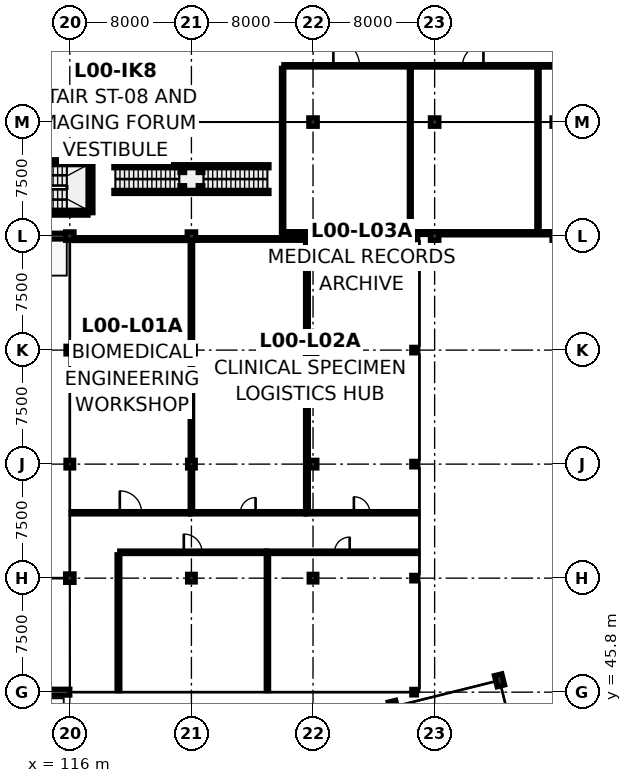
"""IFC4 building model, lengths in metres.
Left out: names, types, materials, properties, quantities, classifications, styles, units other than length and angle.
Written with IfcOpenShell. Run it as: python <this file> out.ifc"""

import sys

from ifc_helpers import new_model, si_unit, direction, frame, frame_2d, origin, origin_2d, place, context, subcontext, project, spatial, rectangle, i_section, extrude, element, fill, save


model = new_model("IFC4")
c1 = context("Model", 3, precision=1e-05, world=origin(), true_north=direction((0.0, 1.0)))
c2 = subcontext(c1, "Body", "Model", "MODEL_VIEW")
j1 = project(units=[si_unit("LENGTHUNIT", "METRE"), si_unit("PLANEANGLEUNIT", "RADIAN")], contexts=[c1])
p1 = place(None, origin())
s1 = spatial("IfcSite", under=j1, at=p1, CompositionType="ELEMENT")
p2 = place(p1, origin())
s2 = spatial("IfcBuilding", under=s1, at=p2, CompositionType="ELEMENT")
p3 = place(p2, origin())
s3 = spatial("IfcBuildingStorey", under=s2, at=p3, CompositionType="ELEMENT", Elevation=0.0)
p4 = place(p3, frame((116.0, 53.3, 0.0), z_axis=(0.0, 0.0, 1.0), x_axis=(1.0, 0.0, 0.0)))
e1 = element("IfcColumn", 1, at=p4, inside=s3, PredefinedType="COLUMN", context=c2, shape_type="SweptSolid", body=[
    extrude(rectangle(XDim=0.55, YDim=0.55, at=origin_2d()), origin(), (0.0, 0.0, 1.0), 4.7),
])
for number, where, z_axis, x_axis in (
    (2, (116.0, 60.8, 0.0), (0.0, 0.0, 1.0), (1.0, 0.0, 0.0)),
    (3, (116.0, 68.3, 0.0), (0.0, 0.0, 1.0), (1.0, 0.0, 0.0)),
):
    element("IfcColumn", number, at=place(p3, frame(where, z_axis=z_axis, x_axis=x_axis)), inside=s3, PredefinedType="COLUMN", context=c2, shape_type="SweptSolid", body=[
        extrude(rectangle(XDim=0.5, YDim=0.5, at=origin_2d()), origin(), (0.0, 0.0, 1.0), 4.704),
    ])
for number, where, z_axis, x_axis in (
    (4, (116.0, 75.8, 0.0), (0.0, 0.0, 1.0), (1.0, 0.0, 0.0)),
    (5, (116.0, 83.3, 0.0), (0.0, 0.0, 1.0), (1.0, 0.0, 0.0)),
):
    element("IfcColumn", number, at=place(p3, frame(where, z_axis=z_axis, x_axis=x_axis)), inside=s3, PredefinedType="COLUMN", context=c2, shape_type="SweptSolid", body=[
        extrude(rectangle(XDim=0.55, YDim=0.55, at=origin_2d()), origin(), (0.0, 0.0, 1.0), 4.7),
    ])
for number, where, z_axis, x_axis in (
    (6, (124.0, 53.3, 0.0), (0.0, 0.0, 1.0), (1.0, 0.0, 0.0)),
    (7, (124.0, 60.8, 0.0), (0.0, 0.0, 1.0), (1.0, 0.0, 0.0)),
    (8, (124.0, 68.3, 0.0), (0.0, 0.0, 1.0), (1.0, 0.0, 0.0)),
):
    element("IfcColumn", number, at=place(p3, frame(where, z_axis=z_axis, x_axis=x_axis)), inside=s3, PredefinedType="COLUMN", context=c2, shape_type="SweptSolid", body=[
        extrude(rectangle(XDim=0.5, YDim=0.5, at=origin_2d()), origin(), (0.0, 0.0, 1.0), 4.704),
    ])
for number, where, z_axis, x_axis in (
    (9, (124.0, 75.8, 0.0), (0.0, 0.0, 1.0), (1.0, 0.0, 0.0)),
    (10, (124.0, 83.3, 0.0), (0.0, 0.0, 1.0), (1.0, 0.0, 0.0)),
):
    element("IfcColumn", number, at=place(p3, frame(where, z_axis=z_axis, x_axis=x_axis)), inside=s3, PredefinedType="COLUMN", context=c2, shape_type="SweptSolid", body=[
        extrude(rectangle(XDim=0.55, YDim=0.55, at=origin_2d()), origin(), (0.0, 0.0, 1.0), 4.7),
    ])
for number, where, z_axis, x_axis in (
    (11, (132.0, 53.3, 0.0), (0.0, 0.0, 1.0), (1.0, 0.0, 0.0)),
    (12, (132.0, 60.8, 0.0), (0.0, 0.0, 1.0), (1.0, 0.0, 0.0)),
    (13, (132.0, 68.3, 0.0), (0.0, 0.0, 1.0), (1.0, 0.0, 0.0)),
):
    element("IfcColumn", number, at=place(p3, frame(where, z_axis=z_axis, x_axis=x_axis)), inside=s3, PredefinedType="COLUMN", context=c2, shape_type="SweptSolid", body=[
        extrude(rectangle(XDim=0.5, YDim=0.5, at=origin_2d()), origin(), (0.0, 0.0, 1.0), 4.704),
    ])
for number, where, z_axis, x_axis in (
    (14, (132.0, 75.8, 0.0), (0.0, 0.0, 1.0), (1.0, 0.0, 0.0)),
    (15, (132.0, 83.3, 0.0), (0.0, 0.0, 1.0), (1.0, 0.0, 0.0)),
    (16, (140.0, 75.8, 0.0), (0.0, 0.0, 1.0), (1.0, 0.0, 0.0)),
    (17, (140.0, 83.3, 0.0), (0.0, 0.0, 1.0), (1.0, 0.0, 0.0)),
):
    element("IfcColumn", number, at=place(p3, frame(where, z_axis=z_axis, x_axis=x_axis)), inside=s3, PredefinedType="COLUMN", context=c2, shape_type="SweptSolid", body=[
        extrude(rectangle(XDim=0.55, YDim=0.55, at=origin_2d()), origin(), (0.0, 0.0, 1.0), 4.7),
    ])
for number, where, z_axis, x_axis in (
    (18, (137.281, 44.837, 0.0), (0.0, 0.0, 1.0), (0.97, 0.242, 0.0)),
    (19, (144.268, 46.579, 0.0), (0.0, 0.0, 1.0), (0.97, 0.242, 0.0)),
):
    element("IfcColumn", number, at=place(p3, frame(where, z_axis=z_axis, x_axis=x_axis)), inside=s3, PredefinedType="COLUMN", context=c2, shape_type="SweptSolid", body=[
        extrude(rectangle(XDim=0.5, YDim=0.75, at=origin_2d()), origin(), (0.0, 0.0, 1.0), 4.7),
    ])
p5 = place(p3, frame((138.65, 45.8, 0.0), z_axis=(0.0, 0.0, 1.0), x_axis=(1.0, 0.0, 0.0)))
e20 = element("IfcColumn", 20, at=p5, inside=s3, PredefinedType="COLUMN", context=c2, shape_type="SweptSolid", body=[
    extrude(i_section(OverallWidth=0.3, OverallDepth=0.36, WebThickness=0.012, FlangeThickness=0.022, FilletRadius=0.027, at=origin_2d()), origin(), (0.0, 0.0, 1.0), 4.735),
])
for number, where, z_axis, x_axis in (
    (21, (138.65, 53.3, 0.0), (0.0, 0.0, 1.0), (1.0, 0.0, 0.0)),
    (22, (138.65, 60.8, 0.0), (0.0, 0.0, 1.0), (1.0, 0.0, 0.0)),
):
    element("IfcColumn", number, at=place(p3, frame(where, z_axis=z_axis, x_axis=x_axis)), inside=s3, PredefinedType="COLUMN", context=c2, shape_type="SweptSolid", body=[
        extrude(i_section(OverallWidth=0.3, OverallDepth=0.36, WebThickness=0.012, FlangeThickness=0.022, FilletRadius=0.027, at=origin_2d()), origin(), (0.0, 0.0, 1.0), 4.733),
    ])
p6 = place(p3, frame((138.65, 68.3, 0.0), z_axis=(0.0, 0.0, 1.0), x_axis=(1.0, 0.0, 0.0)))
e23 = element("IfcColumn", 23, at=p6, inside=s3, PredefinedType="COLUMN", context=c2, shape_type="SweptSolid", body=[
    extrude(i_section(OverallWidth=0.3, OverallDepth=0.36, WebThickness=0.012, FlangeThickness=0.022, FilletRadius=0.027, at=origin_2d()), origin(), (0.0, 0.0, 1.0), 4.733),
])
p7 = place(p3, frame((138.65, 75.75, 0.0), z_axis=(0.0, 0.0, 1.0), x_axis=(1.0, 0.0, 0.0)))
e24 = element("IfcColumn", 24, at=p7, inside=s3, PredefinedType="COLUMN", context=c2, shape_type="SweptSolid", body=[
    extrude(i_section(OverallWidth=0.3, OverallDepth=0.36, WebThickness=0.012, FlangeThickness=0.022, FilletRadius=0.027, at=origin_2d()), origin(), (0.0, 0.0, 1.0), 6.102),
])
p8 = place(p3, frame((116.0, 45.8, 0.0), z_axis=(0.0, 0.0, 1.0), x_axis=(-1.0, 0.0, 0.0)))
e25 = element("IfcWall", 25, at=p8, inside=s3, PredefinedType="SOLIDWALL", context=c2, shape_type="SweptSolid", body=[
    extrude(rectangle(XDim=7.625, YDim=0.38, at=frame_2d((3.812, 0.0))), origin(), (0.0, 0.0, 1.0), 4.67),
])
p9 = place(p8, frame((2.663, 0.0, 0.0)))
e26 = element("IfcOpeningElement", 26, at=p9, cuts=e25, PredefinedType="OPENING", context=c2, shape_type="SweptSolid", body=[
    extrude(rectangle(XDim=2.3, YDim=2.5, at=frame_2d((1.15, 1.25))), frame((0.0, 0.202, 0.0), z_axis=(0.0, -1.0, 0.0), x_axis=(1.0, 0.0, 0.0)), (0.0, 0.0, 1.0), 0.404),
])
p10 = place(p3, frame((115.725, 75.8, 0.0), z_axis=(0.0, 0.0, 1.0), x_axis=(-1.0, 0.0, 0.0)))
e27 = element("IfcWall", 27, at=p10, inside=s3, PredefinedType="SOLIDWALL", context=c2, shape_type="SweptSolid", body=[
    extrude(rectangle(XDim=7.4, YDim=0.38, at=frame_2d((3.7, 0.0))), origin(), (0.0, 0.0, 1.0), 3.985),
])
p11 = place(p10, frame((2.7, 0.0, 0.0)))
e28 = element("IfcOpeningElement", 28, at=p11, cuts=e27, PredefinedType="OPENING", context=c2, shape_type="SweptSolid", body=[
    extrude(rectangle(XDim=2.0, YDim=2.35, at=frame_2d((1.0, 1.175))), frame((0.0, 0.202, 0.0), z_axis=(0.0, -1.0, 0.0), x_axis=(1.0, 0.0, 0.0)), (0.0, 0.0, 1.0), 0.404),
])
p12 = place(p3, frame((110.005, 77.34, 0.0), z_axis=(0.0, 0.0, 1.0), x_axis=(1.0, 0.0, 0.0)))
e29 = element("IfcWall", 29, at=p12, inside=s3, PredefinedType="SHEAR", context=c2, shape_type="SweptSolid", body=[
    extrude(rectangle(XDim=7.19, YDim=0.32, at=frame_2d((3.595, 0.0))), origin(), (0.0, 0.0, 1.0), 4.7),
])
p13 = place(p3, frame((117.36, 77.34, 0.0), z_axis=(0.0, 0.0, 1.0), x_axis=(0.0, 1.0, 0.0)))
e30 = element("IfcWall", 30, at=p13, inside=s3, PredefinedType="SHEAR", context=c2, shape_type="SweptSolid", body=[
    extrude(rectangle(XDim=3.32, YDim=0.32, at=frame_2d((1.66, 0.0))), origin(), (0.0, 0.0, 1.0), 4.7),
])
p14 = place(p3, frame((117.195, 80.66, 0.0), z_axis=(0.0, 0.0, 1.0), x_axis=(-1.0, 0.0, 0.0)))
e31 = element("IfcWall", 31, at=p14, inside=s3, PredefinedType="SHEAR", context=c2, shape_type="SweptSolid", body=[
    extrude(rectangle(XDim=7.19, YDim=0.32, at=frame_2d((3.595, 0.0))), origin(), (0.0, 0.0, 1.0), 4.7),
])
for number, where, z_axis, x_axis in (
    (32, (118.9, 78.705, 0.0), (0.0, 0.0, 1.0), (1.0, 0.0, 0.0)),
    (33, (118.9, 80.395, 0.0), (0.0, 0.0, 1.0), (1.0, 0.0, 0.0)),
):
    element("IfcWall", number, at=place(p3, frame(where, z_axis=z_axis, x_axis=x_axis)), inside=s3, PredefinedType="PARTITIONING", context=c2, shape_type="SweptSolid", body=[
        extrude(rectangle(XDim=10.2, YDim=0.2, at=frame_2d((5.1, 0.0))), origin(), (0.0, 0.0, 1.0), 2.3),
    ])
for number, where, z_axis, x_axis in (
    (34, (123.4, 78.965, 0.0), (0.0, 0.0, 1.0), (1.0, 0.0, 0.0)),
    (35, (124.6, 78.965, 0.0), (0.0, 0.0, 1.0), (1.0, 0.0, 0.0)),
    (36, (124.6, 80.135, 0.0), (0.0, 0.0, 1.0), (1.0, 0.0, 0.0)),
    (37, (123.4, 80.135, 0.0), (0.0, 0.0, 1.0), (1.0, 0.0, 0.0)),
):
    element("IfcColumn", number, at=place(p3, frame(where, z_axis=z_axis, x_axis=x_axis)), inside=s3, PredefinedType="COLUMN", context=c2, shape_type="SweptSolid", body=[
        extrude(i_section(OverallWidth=0.3, OverallDepth=0.3, WebThickness=0.011, FlangeThickness=0.019, FilletRadius=0.027, at=origin_2d()), origin(), (0.0, 0.0, 1.0), 2.3),
    ])
p15 = place(p3, frame((116.102, 57.6, 0.0), z_axis=(0.0, 0.0, 1.0), x_axis=(1.0, 0.0, 0.0)))
e38 = element("IfcWall", 38, at=p15, inside=s3, PredefinedType="PARTITIONING", context=c2, shape_type="SweptSolid", body=[
    extrude(rectangle(XDim=7.813, YDim=0.15, at=frame_2d((3.906, 0.0))), origin(), (0.0, 0.0, 1.0), 4.67),
])
p16 = place(p15, frame((3.187, 0.0, 0.0)))
e39 = element("IfcOpeningElement", 39, at=p16, cuts=e38, PredefinedType="OPENING", context=c2, shape_type="SweptSolid", body=[
    extrude(rectangle(XDim=1.44, YDim=2.32, at=frame_2d((0.72, 1.16))), frame((0.0, 0.087, 0.0), z_axis=(0.0, -1.0, 0.0), x_axis=(1.0, 0.0, 0.0)), (0.0, 0.0, 1.0), 0.174),
])
p17 = place(p3, frame((123.927, 57.6, 0.0), z_axis=(0.0, 0.0, 1.0), x_axis=(1.0, 0.0, 0.0)))
e40 = element("IfcWall", 40, at=p17, inside=s3, PredefinedType="PARTITIONING", context=c2, shape_type="SweptSolid", body=[
    extrude(rectangle(XDim=7.588, YDim=0.15, at=frame_2d((3.794, 0.0))), origin(), (0.0, 0.0, 1.0), 4.67),
])
p18 = place(p17, frame((3.294, 0.0, 0.0)))
e41 = element("IfcOpeningElement", 41, at=p18, cuts=e40, PredefinedType="OPENING", context=c2, shape_type="SweptSolid", body=[
    extrude(rectangle(XDim=1.0, YDim=2.15, at=frame_2d((0.5, 1.075))), frame((0.0, 0.087, 0.0), z_axis=(0.0, -1.0, 0.0), x_axis=(1.0, 0.0, 0.0)), (0.0, 0.0, 1.0), 0.174),
])
p19 = place(p3, frame((131.527, 57.6, 0.0), z_axis=(0.0, 0.0, 1.0), x_axis=(1.0, 0.0, 0.0)))
e42 = element("IfcWall", 42, at=p19, inside=s3, PredefinedType="PARTITIONING", context=c2, shape_type="SweptSolid", body=[
    extrude(rectangle(XDim=7.371, YDim=0.15, at=frame_2d((3.686, 0.0))), origin(), (0.0, 0.0, 1.0), 4.018),
])
p20 = place(p19, frame((3.16, 0.0, 0.0)))
e43 = element("IfcOpeningElement", 43, at=p20, cuts=e42, PredefinedType="OPENING", context=c2, shape_type="SweptSolid", body=[
    extrude(rectangle(XDim=1.05, YDim=2.15, at=frame_2d((0.525, 1.075))), frame((0.0, 0.087, 0.0), z_axis=(0.0, -1.0, 0.0), x_axis=(1.0, 0.0, 0.0)), (0.0, 0.0, 1.0), 0.174),
])
p21 = place(p3, frame((119.285, 55.0, 0.0), z_axis=(0.0, 0.0, 1.0), x_axis=(1.0, 0.0, 0.0)))
e44 = element("IfcWall", 44, at=p21, inside=s3, PredefinedType="PARTITIONING", context=c2, shape_type="SweptSolid", body=[
    extrude(rectangle(XDim=9.63, YDim=0.16, at=frame_2d((4.815, 0.0))), origin(), (0.0, 0.0, 1.0), 4.67),
])
p22 = place(p21, frame((4.215, 0.0, 0.0)))
e45 = element("IfcOpeningElement", 45, at=p22, cuts=e44, PredefinedType="OPENING", context=c2, shape_type="SweptSolid", body=[
    extrude(rectangle(XDim=1.2, YDim=2.15, at=frame_2d((0.6, 1.075))), frame((0.0, 0.092, 0.0), z_axis=(0.0, -1.0, 0.0), x_axis=(1.0, 0.0, 0.0)), (0.0, 0.0, 1.0), 0.184),
])
p23 = place(p3, frame((128.927, 55.0, 0.0), z_axis=(0.0, 0.0, 1.0), x_axis=(1.0, 0.0, 0.0)))
e46 = element("IfcWall", 46, at=p23, inside=s3, PredefinedType="PARTITIONING", context=c2, shape_type="SweptSolid", body=[
    extrude(rectangle(XDim=9.971, YDim=0.16, at=frame_2d((4.985, 0.0))), origin(), (0.0, 0.0, 1.0), 4.018),
])
p24 = place(p23, frame((4.486, 0.0, 0.0)))
e47 = element("IfcOpeningElement", 47, at=p24, cuts=e46, PredefinedType="OPENING", context=c2, shape_type="SweptSolid", body=[
    extrude(rectangle(XDim=1.0, YDim=2.22, at=frame_2d((0.5, 1.11))), frame((0.0, 0.092, 0.0), z_axis=(0.0, -1.0, 0.0), x_axis=(1.0, 0.0, 0.0)), (0.0, 0.0, 1.0), 0.184),
])
p25 = place(p3, frame((130.085, 87.0, 0.0), z_axis=(0.0, 0.0, 1.0), x_axis=(1.0, 0.0, 0.0)))
e48 = element("IfcWall", 48, at=p25, inside=s3, PredefinedType="PARTITIONING", context=c2, shape_type="SweptSolid", body=[
    extrude(rectangle(XDim=8.23, YDim=0.15, at=frame_2d((4.115, 0.0))), origin(), (0.0, 0.0, 1.0), 3.985),
])
p26 = place(p25, frame((3.255, 0.0, 0.0)))
e49 = element("IfcOpeningElement", 49, at=p26, cuts=e48, PredefinedType="OPENING", context=c2, shape_type="SweptSolid", body=[
    extrude(rectangle(XDim=1.72, YDim=2.34, at=frame_2d((0.86, 1.17))), frame((0.0, 0.087, 0.0), z_axis=(0.0, -1.0, 0.0), x_axis=(1.0, 0.0, 0.0)), (0.0, 0.0, 1.0), 0.174),
])
p27 = place(p3, frame((138.327, 87.0, 0.0), z_axis=(0.0, 0.0, 1.0), x_axis=(1.0, 0.0, 0.0)))
e50 = element("IfcWall", 50, at=p27, inside=s3, PredefinedType="PARTITIONING", context=c2, shape_type="SweptSolid", body=[
    extrude(rectangle(XDim=8.388, YDim=0.16, at=frame_2d((4.194, 0.0))), origin(), (0.0, 0.0, 1.0), 3.985),
])
p28 = place(p27, frame((3.504, 0.0, 0.0)))
e51 = element("IfcOpeningElement", 51, at=p28, cuts=e50, PredefinedType="OPENING", context=c2, shape_type="SweptSolid", body=[
    extrude(rectangle(XDim=1.38, YDim=2.3, at=frame_2d((0.69, 1.15))), frame((0.0, 0.092, 0.0), z_axis=(0.0, -1.0, 0.0), x_axis=(1.0, 0.0, 0.0)), (0.0, 0.0, 1.0), 0.184),
])
p29 = place(p3, frame((146.727, 87.0, 0.0), z_axis=(0.0, 0.0, 1.0), x_axis=(1.0, 0.0, 0.0)))
e52 = element("IfcWall", 52, at=p29, inside=s3, PredefinedType="PARTITIONING", context=c2, shape_type="SweptSolid", body=[
    extrude(rectangle(XDim=8.388, YDim=0.16, at=frame_2d((4.194, 0.0))), origin(), (0.0, 0.0, 1.0), 3.985),
])
p30 = place(p29, frame((3.474, 0.0, 0.0)))
e53 = element("IfcOpeningElement", 53, at=p30, cuts=e52, PredefinedType="OPENING", context=c2, shape_type="SweptSolid", body=[
    extrude(rectangle(XDim=1.44, YDim=2.32, at=frame_2d((0.72, 1.16))), frame((0.0, 0.092, 0.0), z_axis=(0.0, -1.0, 0.0), x_axis=(1.0, 0.0, 0.0)), (0.0, 0.0, 1.0), 0.184),
])
p31 = place(p3, frame((116.287, 75.6, 0.0), z_axis=(0.0, 0.0, 1.0), x_axis=(1.0, 0.0, 0.0)))
e54 = element("IfcWall", 54, at=p31, inside=s3, PredefinedType="PARTITIONING", context=c2, shape_type="SweptSolid", body=[
    extrude(rectangle(XDim=7.461, YDim=0.18, at=frame_2d((3.73, 0.0))), origin(), (0.0, 0.0, 1.0), 3.985),
])
p32 = place(p3, frame((124.252, 75.6, 0.0), z_axis=(0.0, 0.0, 1.0), x_axis=(1.0, 0.0, 0.0)))
e55 = element("IfcWall", 55, at=p32, inside=s3, PredefinedType="PARTITIONING", context=c2, shape_type="SweptSolid", body=[
    extrude(rectangle(XDim=7.461, YDim=0.15, at=frame_2d((3.73, 0.0))), origin(), (0.0, 0.0, 1.0), 3.985),
])
p33 = place(p3, frame((132.205, 75.6, 0.0), z_axis=(0.0, 0.0, 1.0), x_axis=(1.0, 0.0, 0.0)))
e56 = element("IfcWall", 56, at=p33, inside=s3, PredefinedType="PARTITIONING", context=c2, shape_type="SweptSolid", body=[
    extrude(rectangle(XDim=6.343, YDim=0.125, at=frame_2d((3.171, 0.0))), origin(), (0.0, 0.0, 1.0), 3.985),
])
p34 = place(p3, frame((130.085, 76.0, 0.0), z_axis=(0.0, 0.0, 1.0), x_axis=(1.0, 0.0, 0.0)))
e57 = element("IfcWall", 57, at=p34, inside=s3, PredefinedType="PARTITIONING", context=c2, shape_type="SweptSolid", body=[
    extrude(rectangle(XDim=8.23, YDim=0.18, at=frame_2d((4.115, 0.0))), origin(), (0.0, 0.0, 1.0), 3.985),
])
p35 = place(p3, frame((138.327, 76.0, 0.0), z_axis=(0.0, 0.0, 1.0), x_axis=(1.0, 0.0, 0.0)))
e58 = element("IfcWall", 58, at=p35, inside=s3, PredefinedType="PARTITIONING", context=c2, shape_type="SweptSolid", body=[
    extrude(rectangle(XDim=9.386, YDim=0.18, at=frame_2d((4.693, 0.0))), origin(), (0.0, 0.0, 1.0), 3.985),
])
p36 = place(p3, frame((124.0, 57.687, 0.0), z_axis=(0.0, 0.0, 1.0), x_axis=(0.0, 1.0, 0.0)))
e59 = element("IfcWall", 59, at=p36, inside=s3, PredefinedType="PARTITIONING", context=c2, shape_type="SweptSolid", body=[
    extrude(rectangle(XDim=17.826, YDim=0.16, at=frame_2d((8.913, 0.0))), origin(), (0.0, 0.0, 1.0), 3.985),
])
p37 = place(p3, frame((131.6, 57.687, 0.0), z_axis=(0.0, 0.0, 1.0), x_axis=(0.0, 1.0, 0.0)))
e60 = element("IfcWall", 60, at=p37, inside=s3, PredefinedType="PARTITIONING", context=c2, shape_type="SweptSolid", body=[
    extrude(rectangle(XDim=17.826, YDim=0.18, at=frame_2d((8.913, 0.0))), origin(), (0.0, 0.0, 1.0), 3.985),
])
p38 = place(p3, frame((119.2, 45.902, 0.0), z_axis=(0.0, 0.0, 1.0), x_axis=(0.0, 1.0, 0.0)))
e61 = element("IfcWall", 61, at=p38, inside=s3, PredefinedType="PARTITIONING", context=c2, shape_type="SweptSolid", body=[
    extrude(rectangle(XDim=8.933, YDim=0.18, at=frame_2d((4.466, 0.0))), origin(), (0.0, 0.0, 1.0), 4.67),
])
p39 = place(p3, frame((129.0, 45.902, 0.0), z_axis=(0.0, 0.0, 1.0), x_axis=(0.0, 1.0, 0.0)))
e62 = element("IfcWall", 62, at=p39, inside=s3, PredefinedType="PARTITIONING", context=c2, shape_type="SweptSolid", body=[
    extrude(rectangle(XDim=9.006, YDim=0.15, at=frame_2d((4.503, 0.0))), origin(), (0.0, 0.0, 1.0), 4.67),
])
p40 = place(p3, frame((130.0, 75.687, 0.0), z_axis=(0.0, 0.0, 1.0), x_axis=(0.0, 1.0, 0.0)))
e63 = element("IfcWall", 63, at=p40, inside=s3, PredefinedType="PARTITIONING", context=c2, shape_type="SweptSolid", body=[
    extrude(rectangle(XDim=11.148, YDim=0.15, at=frame_2d((5.574, 0.0))), origin(), (0.0, 0.0, 1.0), 3.885),
])
p41 = place(p3, frame((138.4, 76.102, 0.0), z_axis=(0.0, 0.0, 1.0), x_axis=(0.0, 1.0, 0.0)))
e64 = element("IfcWall", 64, at=p41, inside=s3, PredefinedType="PARTITIONING", context=c2, shape_type="SweptSolid", body=[
    extrude(rectangle(XDim=10.806, YDim=0.125, at=frame_2d((5.403, 0.0))), origin(), (0.0, 0.0, 1.0), 3.885),
])
p42 = place(p3, frame((146.8, 76.102, 0.0), z_axis=(0.0, 0.0, 1.0), x_axis=(0.0, 1.0, 0.0)))
e65 = element("IfcWall", 65, at=p42, inside=s3, PredefinedType="PARTITIONING", context=c2, shape_type="SweptSolid", body=[
    extrude(rectangle(XDim=10.806, YDim=0.15, at=frame_2d((5.403, 0.0))), origin(), (0.0, 0.0, 1.0), 3.885),
])
p43 = place(p16, origin())
e66 = element("IfcDoor", 66, at=p43, inside=s3, OperationType="SINGLE_SWING_LEFT", PredefinedType="DOOR", context=c2, shape_type="SweptSolid", body=[
    extrude(rectangle(XDim=1.44, YDim=2.32, at=frame_2d((0.72, 1.16))), frame((0.0, 0.025, 0.0), z_axis=(0.0, -1.0, 0.0), x_axis=(1.0, 0.0, 0.0)), (0.0, 0.0, 1.0), 0.05),
])
fill(e39, e66)
p44 = place(p18, origin())
e67 = element("IfcDoor", 67, at=p44, inside=s3, OperationType="SINGLE_SWING_RIGHT", PredefinedType="DOOR", context=c2, shape_type="SweptSolid", body=[
    extrude(rectangle(XDim=1.0, YDim=2.15, at=frame_2d((0.5, 1.075))), frame((0.0, 0.025, 0.0), z_axis=(0.0, -1.0, 0.0), x_axis=(1.0, 0.0, 0.0)), (0.0, 0.0, 1.0), 0.05),
])
fill(e41, e67)
p45 = place(p20, origin())
e68 = element("IfcDoor", 68, at=p45, inside=s3, OperationType="SINGLE_SWING_LEFT", PredefinedType="DOOR", context=c2, shape_type="SweptSolid", body=[
    extrude(rectangle(XDim=1.05, YDim=2.15, at=frame_2d((0.525, 1.075))), frame((0.0, 0.025, 0.0), z_axis=(0.0, -1.0, 0.0), x_axis=(1.0, 0.0, 0.0)), (0.0, 0.0, 1.0), 0.05),
])
fill(e43, e68)
p46 = place(p22, origin())
e69 = element("IfcDoor", 69, at=p46, inside=s3, OperationType="SINGLE_SWING_LEFT", PredefinedType="DOOR", context=c2, shape_type="SweptSolid", body=[
    extrude(rectangle(XDim=1.2, YDim=2.15, at=frame_2d((0.6, 1.075))), frame((0.0, 0.025, 0.0), z_axis=(0.0, -1.0, 0.0), x_axis=(1.0, 0.0, 0.0)), (0.0, 0.0, 1.0), 0.05),
])
fill(e45, e69)
p47 = place(p24, origin())
e70 = element("IfcDoor", 70, at=p47, inside=s3, OperationType="SINGLE_SWING_RIGHT", PredefinedType="DOOR", context=c2, shape_type="SweptSolid", body=[
    extrude(rectangle(XDim=1.0, YDim=2.22, at=frame_2d((0.5, 1.11))), frame((0.0, 0.025, 0.0), z_axis=(0.0, -1.0, 0.0), x_axis=(1.0, 0.0, 0.0)), (0.0, 0.0, 1.0), 0.05),
])
fill(e47, e70)
p48 = place(p26, origin())
e71 = element("IfcDoor", 71, at=p48, inside=s3, OperationType="SINGLE_SWING_LEFT", PredefinedType="DOOR", context=c2, shape_type="SweptSolid", body=[
    extrude(rectangle(XDim=1.72, YDim=2.34, at=frame_2d((0.86, 1.17))), frame((0.0, 0.025, 0.0), z_axis=(0.0, -1.0, 0.0), x_axis=(1.0, 0.0, 0.0)), (0.0, 0.0, 1.0), 0.05),
])
fill(e49, e71)
p49 = place(p28, origin())
e72 = element("IfcDoor", 72, at=p49, inside=s3, OperationType="SINGLE_SWING_RIGHT", PredefinedType="DOOR", context=c2, shape_type="SweptSolid", body=[
    extrude(rectangle(XDim=1.38, YDim=2.3, at=frame_2d((0.69, 1.15))), frame((0.0, 0.025, 0.0), z_axis=(0.0, -1.0, 0.0), x_axis=(1.0, 0.0, 0.0)), (0.0, 0.0, 1.0), 0.05),
])
fill(e51, e72)
save(model, sys.argv[1])
